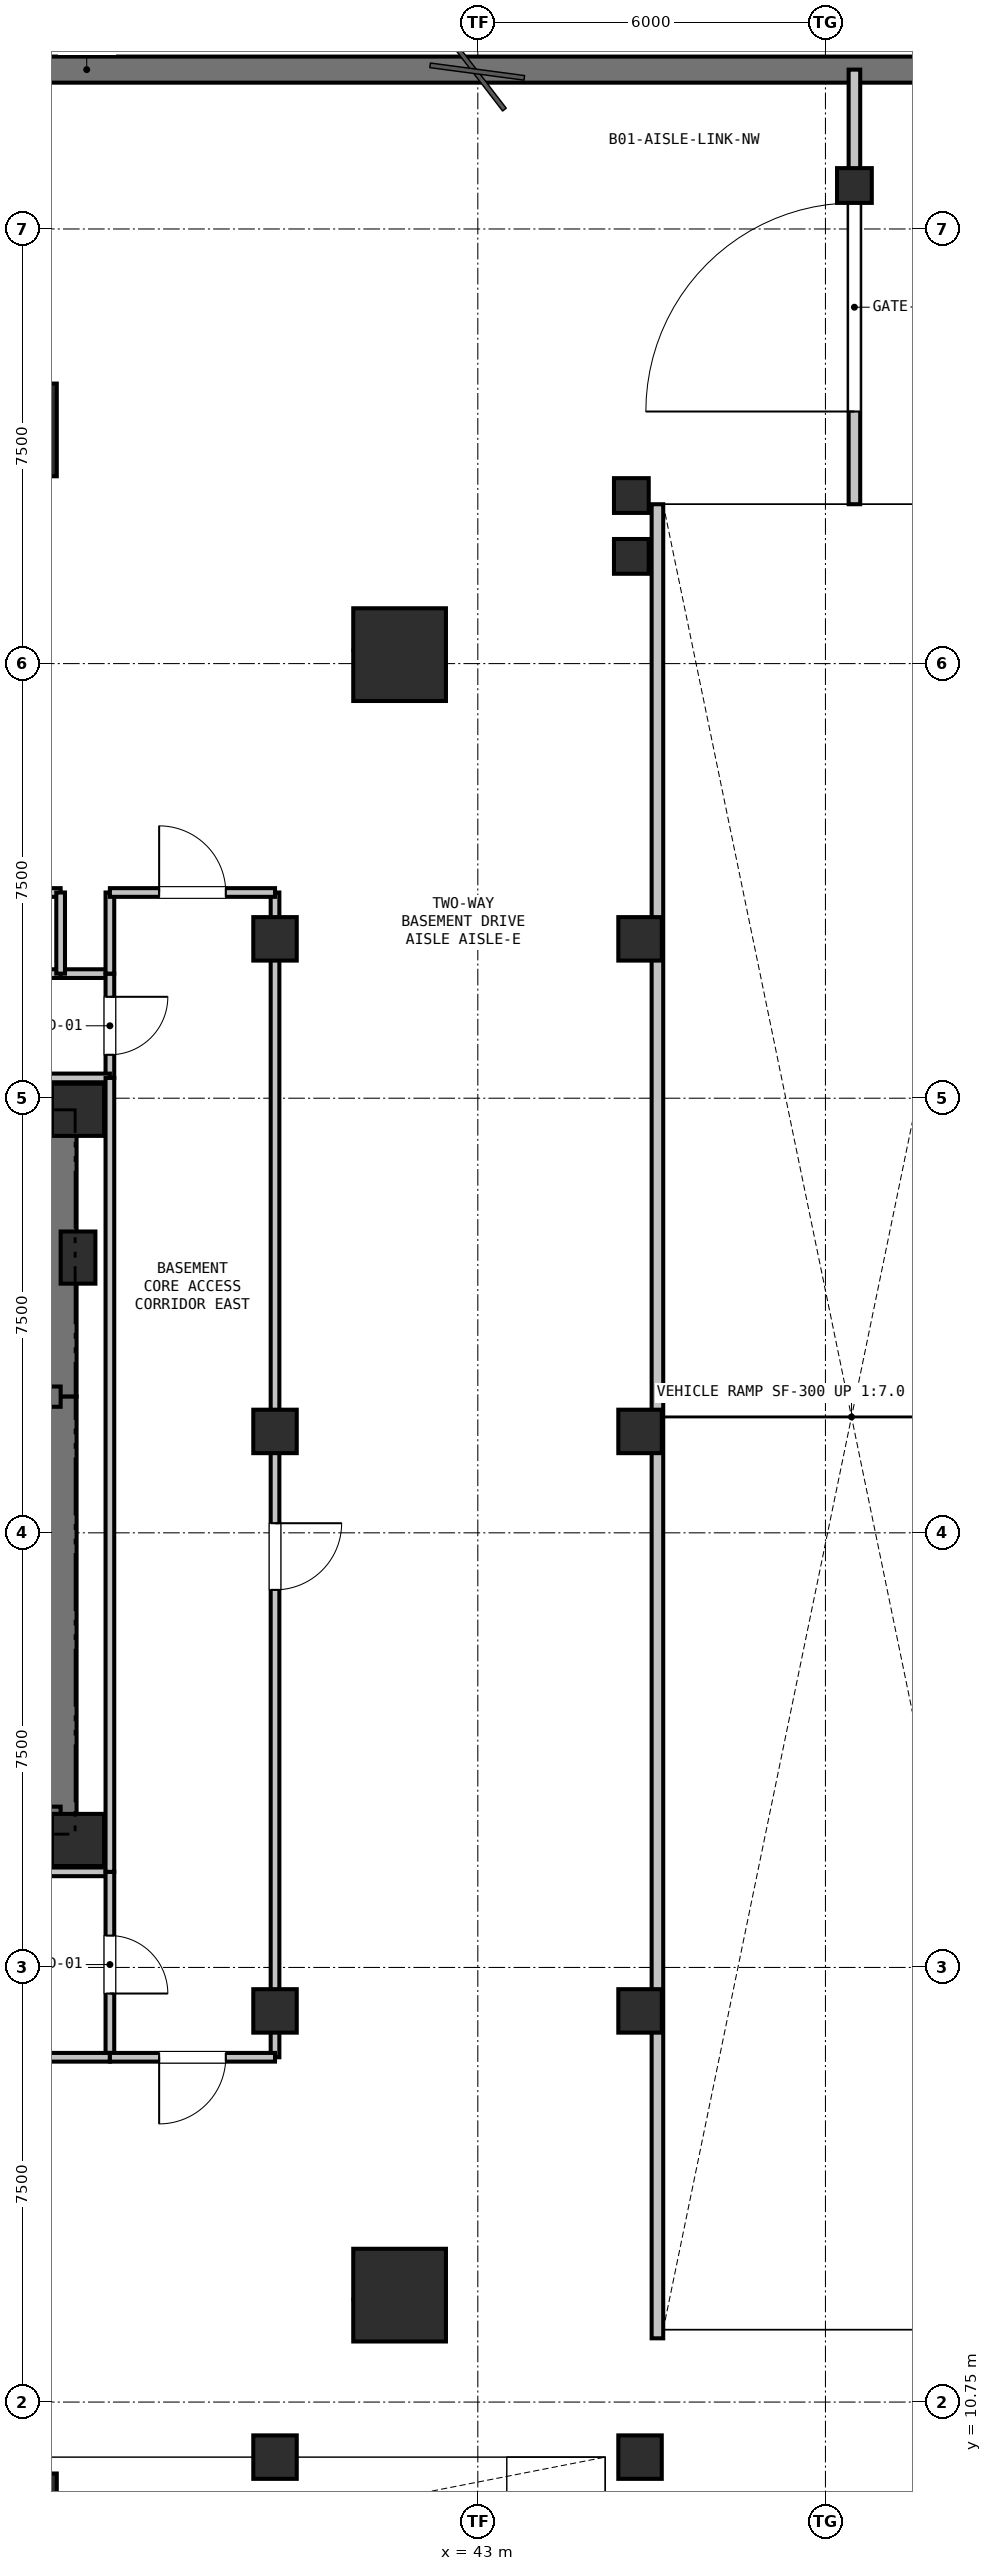
"""IFC4 building model, lengths in metres.
Left out: names, types, materials, properties, quantities, classifications, styles, units other than length and angle.
Written with IfcOpenShell. Run it as: python <this file> out.ifc"""

import sys

from ifc_helpers import new_model, si_unit, direction, frame, frame_2d, origin, origin_2d, place, context, subcontext, project, spatial, rectangle, hollow_rectangle, extrude, element, fill, save


model = new_model("IFC4")
c1 = context("Model", 3, precision=1e-05, world=origin(), true_north=direction((0.0, 1.0)))
c2 = subcontext(c1, "Body", "Model", "MODEL_VIEW")
j1 = project(units=[si_unit("LENGTHUNIT", "METRE"), si_unit("PLANEANGLEUNIT", "RADIAN")], contexts=[c1])
p1 = place(None, origin())
s1 = spatial("IfcSite", under=j1, at=p1, CompositionType="ELEMENT")
p2 = place(p1, origin())
s2 = spatial("IfcBuilding", under=s1, at=p2, CompositionType="ELEMENT")
p3 = place(p2, frame((0.0, 0.0, -4.5)))
s3 = spatial("IfcBuildingStorey", under=s2, at=p3, CompositionType="ELEMENT", Elevation=-4.5)
p4 = place(p3, frame((77.0, 51.0, 0.0), z_axis=(0.0, 0.0, 1.0), x_axis=(-1.0, 0.0, 0.0)))
e1 = element("IfcWall", 1, at=p4, inside=s3, PredefinedType="USERDEFINED", context=c2, shape_type="SweptSolid", body=[
    extrude(rectangle(XDim=81.5, YDim=0.45, at=frame_2d((40.75, 0.0))), origin(), (0.0, 0.0, 1.0), 4.5),
])
for number, where, z_axis, x_axis in (
    (2, (34.933, 44.783, 0.0), (0.0, 0.0, 1.0), (1.0, 0.0, 0.0)),
    (3, (41.65, 40.905, 0.0), (0.0, 0.0, 1.0), (1.0, 0.0, 0.0)),
    (4, (41.65, 12.595, 0.0), (0.0, 0.0, 1.0), (1.0, 0.0, 0.0)),
    (5, (34.933, 8.717, 0.0), (0.0, 0.0, 1.0), (1.0, 0.0, 0.0)),
):
    element("IfcColumn", number, at=place(p3, frame(where, z_axis=z_axis, x_axis=x_axis)), inside=s3, PredefinedType="COLUMN", context=c2, shape_type="SweptSolid", body=[
        extrude(hollow_rectangle(XDim=1.6, YDim=1.6, WallThickness=0.04, at=origin_2d()), origin(), (0.0, 0.0, 1.0), 4.5),
    ])
for number, where, z_axis, x_axis in (
    (6, (45.65, 42.6, 0.0), (0.0, 0.0, 1.0), (1.0, 0.0, 0.0)),
    (7, (49.5, 49.0, 0.0), (0.0, 0.0, 1.0), (1.0, 0.0, 0.0)),
    (8, (45.65, 43.65, 0.0), (0.0, 0.0, 1.0), (1.0, 0.0, 0.0)),
):
    element("IfcColumn", number, at=place(p3, frame(where, z_axis=z_axis, x_axis=x_axis)), inside=s3, PredefinedType="COLUMN", context=c2, shape_type="SweptSolid", body=[
        extrude(rectangle(XDim=0.6, YDim=0.6, at=origin_2d()), origin(), (0.0, 0.0, 1.0), 4.5),
    ])
for number, where, z_axis, x_axis in (
    (9, (39.5, 9.8, 0.0), (0.0, 0.0, 1.0), (1.0, 0.0, 0.0)),
    (10, (39.5, 17.5, 0.0), (0.0, 0.0, 1.0), (1.0, 0.0, 0.0)),
    (11, (39.5, 27.5, 0.0), (0.0, 0.0, 1.0), (1.0, 0.0, 0.0)),
    (12, (39.5, 36.0, 0.0), (0.0, 0.0, 1.0), (1.0, 0.0, 0.0)),
    (13, (45.8, 9.8, 0.0), (0.0, 0.0, 1.0), (1.0, 0.0, 0.0)),
    (14, (45.8, 17.5, 0.0), (0.0, 0.0, 1.0), (1.0, 0.0, 0.0)),
    (15, (45.8, 27.5, 0.0), (0.0, 0.0, 1.0), (1.0, 0.0, 0.0)),
    (16, (45.8, 36.0, 0.0), (0.0, 0.0, 1.0), (1.0, 0.0, 0.0)),
):
    element("IfcColumn", number, at=place(p3, frame(where, z_axis=z_axis, x_axis=x_axis)), inside=s3, PredefinedType="COLUMN", context=c2, shape_type="SweptSolid", body=[
        extrude(rectangle(XDim=0.75, YDim=0.75, at=origin_2d()), origin(), (0.0, 0.0, 1.0), 4.5),
    ])
for number, where, z_axis, x_axis in (
    (17, (36.1, 33.05, 0.0), (0.0, 0.0, 1.0), (1.0, 0.0, 0.0)),
    (18, (36.1, 20.45, 0.0), (0.0, 0.0, 1.0), (1.0, 0.0, 0.0)),
):
    element("IfcColumn", number, at=place(p3, frame(where, z_axis=z_axis, x_axis=x_axis)), inside=s3, PredefinedType="COLUMN", context=c2, shape_type="SweptSolid", body=[
        extrude(rectangle(XDim=0.9, YDim=0.9, at=origin_2d()), origin(), (0.0, 0.0, 1.0), 4.5),
    ])
p5 = place(p3, frame((36.1, 30.5, 0.0), z_axis=(0.0, 0.0, 1.0), x_axis=(1.0, 0.0, 0.0)))
e19 = element("IfcColumn", 19, at=p5, inside=s3, PredefinedType="PILASTER", context=c2, shape_type="SweptSolid", body=[
    extrude(rectangle(XDim=0.6, YDim=0.9, at=origin_2d()), origin(), (0.0, 0.0, 1.0), 4.5),
])
p6 = place(p3, frame((46.1, 11.85, 0.0), z_axis=(0.0, 0.0, 1.0), x_axis=(0.0, 1.0, 0.0)))
e20 = element("IfcWall", 20, at=p6, inside=s3, PredefinedType="PARAPET", context=c2, shape_type="SweptSolid", body=[
    extrude(rectangle(XDim=31.65, YDim=0.2, at=frame_2d((15.825, 0.0))), origin(), (0.0, 0.0, 1.0), 5.75),
])
p7 = place(p3, frame((32.35, 32.75, 0.0), z_axis=(0.0, 0.0, 1.0), x_axis=(1.0, 0.0, 0.0)))
e21 = element("IfcWall", 21, at=p7, inside=s3, PredefinedType="SHEAR", context=c2, shape_type="SweptSolid", body=[
    extrude(rectangle(XDim=3.45, YDim=0.55, at=frame_2d((1.725, 0.0))), origin(), (0.0, 0.0, 1.0), 4.2),
])
p8 = place(p7, frame((0.65, 0.0, 0.0)))
e22 = element("IfcOpeningElement", 22, at=p8, cuts=e21, PredefinedType="OPENING", context=c2, shape_type="SweptSolid", body=[
    extrude(rectangle(XDim=1.15, YDim=2.15, at=frame_2d((0.575, 1.075))), frame((0.0, 0.285, 0.0), z_axis=(0.0, -1.0, 0.0), x_axis=(1.0, 0.0, 0.0)), (0.0, 0.0, 1.0), 0.57),
])
p9 = place(p3, frame((35.8, 32.75, 0.0), z_axis=(0.0, 0.0, 1.0), x_axis=(0.0, -1.0, 0.0)))
e23 = element("IfcWall", 23, at=p9, inside=s3, PredefinedType="SHEAR", context=c2, shape_type="SweptSolid", body=[
    extrude(rectangle(XDim=4.65, YDim=0.55, at=frame_2d((2.325, 0.0))), origin(), (0.0, 0.0, 1.0), 4.2),
])
p10 = place(p3, frame((35.8, 28.1, 0.0), z_axis=(0.0, 0.0, 1.0), x_axis=(0.0, -1.0, 0.0)))
e24 = element("IfcWall", 24, at=p10, inside=s3, PredefinedType="SHEAR", context=c2, shape_type="SweptSolid", body=[
    extrude(rectangle(XDim=7.35, YDim=0.55, at=frame_2d((3.675, 0.0))), origin(), (0.0, 0.0, 1.0), 4.2),
])
p11 = place(p3, frame((35.8, 20.75, 0.0), z_axis=(0.0, 0.0, 1.0), x_axis=(-1.0, 0.0, 0.0)))
e25 = element("IfcWall", 25, at=p11, inside=s3, PredefinedType="SHEAR", context=c2, shape_type="SweptSolid", body=[
    extrude(rectangle(XDim=3.45, YDim=0.55, at=frame_2d((1.725, 0.0))), origin(), (0.0, 0.0, 1.0), 4.2),
])
p12 = place(p3, frame((32.35, 28.1, 0.0), z_axis=(0.0, 0.0, 1.0), x_axis=(1.0, 0.0, 0.0)))
e26 = element("IfcWall", 26, at=p12, inside=s3, PredefinedType="SHEAR", context=c2, shape_type="SweptSolid", body=[
    extrude(rectangle(XDim=3.45, YDim=0.35, at=frame_2d((1.725, 0.0))), origin(), (0.0, 0.0, 1.0), 4.2),
])
p13 = place(p12, frame((1.15, 0.0, 0.0)))
e27 = element("IfcOpeningElement", 27, at=p13, cuts=e26, PredefinedType="OPENING", context=c2, shape_type="SweptSolid", body=[
    extrude(rectangle(XDim=1.15, YDim=2.15, at=frame_2d((0.575, 1.075))), frame((0.0, 0.185, 0.0), z_axis=(0.0, -1.0, 0.0), x_axis=(1.0, 0.0, 0.0)), (0.0, 0.0, 1.0), 0.37),
])
p14 = place(p3, frame((49.5, 43.5, 0.0), z_axis=(0.0, 0.0, 1.0), x_axis=(0.0, 1.0, 0.0)))
e28 = element("IfcWall", 28, at=p14, inside=s3, PredefinedType="PARTITIONING", context=c2, shape_type="SweptSolid", body=[
    extrude(rectangle(XDim=7.5, YDim=0.2, at=frame_2d((3.75, 0.0))), origin(), (0.0, 0.0, 1.0), 4.2),
])
p15 = place(p14, frame((1.6, 0.0, 0.0)))
e29 = element("IfcOpeningElement", 29, at=p15, cuts=e28, PredefinedType="OPENING", context=c2, shape_type="SweptSolid", body=[
    extrude(rectangle(XDim=3.6, YDim=2.8, at=frame_2d((1.8, 1.4))), frame((0.0, 0.11, 0.0), z_axis=(0.0, -1.0, 0.0), x_axis=(1.0, 0.0, 0.0)), (0.0, 0.0, 1.0), 0.22),
])
p16 = place(p3, frame((22.2, 35.4, 0.0), z_axis=(0.0, 0.0, 1.0), x_axis=(1.0, 0.0, 0.0)))
e30 = element("IfcWall", 30, at=p16, inside=s3, PredefinedType="PARTITIONING", context=c2, shape_type="SweptSolid", body=[
    extrude(rectangle(XDim=13.6, YDim=0.15, at=frame_2d((6.8, 0.0))), origin(), (0.0, 0.0, 1.0), 4.2),
])
p17 = place(p16, frame((6.375, 0.0, 0.0)))
e31 = element("IfcOpeningElement", 31, at=p17, cuts=e30, PredefinedType="OPENING", context=c2, shape_type="SweptSolid", body=[
    extrude(rectangle(XDim=0.85, YDim=2.1, at=frame_2d((0.425, 1.05))), frame((0.0, 0.085, 0.0), z_axis=(0.0, -1.0, 0.0), x_axis=(1.0, 0.0, 0.0)), (0.0, 0.0, 1.0), 0.17),
])
p18 = place(p3, frame((35.8, 35.4, 0.0), z_axis=(0.0, 0.0, 1.0), x_axis=(1.0, 0.0, 0.0)))
e32 = element("IfcWall", 32, at=p18, inside=s3, PredefinedType="PARTITIONING", context=c2, shape_type="SweptSolid", body=[
    extrude(rectangle(XDim=0.85, YDim=0.15, at=frame_2d((0.425, 0.0))), origin(), (0.0, 0.0, 1.0), 4.2),
])
p19 = place(p3, frame((36.65, 35.4, 0.0), z_axis=(0.0, 0.0, 1.0), x_axis=(0.0, -1.0, 0.0)))
e33 = element("IfcWall", 33, at=p19, inside=s3, PredefinedType="PARTITIONING", context=c2, shape_type="SweptSolid", body=[
    extrude(rectangle(XDim=1.8, YDim=0.15, at=frame_2d((0.9, 0.0))), origin(), (0.0, 0.0, 1.0), 4.2),
])
p20 = place(p19, frame((0.4, 0.0, 0.0)))
e34 = element("IfcOpeningElement", 34, at=p20, cuts=e33, PredefinedType="OPENING", context=c2, shape_type="SweptSolid", body=[
    extrude(rectangle(XDim=1.0, YDim=2.15, at=frame_2d((0.5, 1.075))), frame((0.0, 0.085, 0.0), z_axis=(0.0, -1.0, 0.0), x_axis=(1.0, 0.0, 0.0)), (0.0, 0.0, 1.0), 0.17),
])
for number, where, z_axis, x_axis in (
    (35, (36.65, 33.6, 0.0), (0.0, 0.0, 1.0), (-1.0, 0.0, 0.0)),
    (36, (21.35, 19.9, 0.0), (0.0, 0.0, 1.0), (1.0, 0.0, 0.0)),
):
    element("IfcWall", number, at=place(p3, frame(where, z_axis=z_axis, x_axis=x_axis)), inside=s3, PredefinedType="PARTITIONING", context=c2, shape_type="SweptSolid", body=[
        extrude(rectangle(XDim=15.3, YDim=0.15, at=frame_2d((7.65, 0.0))), origin(), (0.0, 0.0, 1.0), 4.2),
    ])
p21 = place(p3, frame((36.65, 19.9, 0.0), z_axis=(0.0, 0.0, 1.0), x_axis=(0.0, -1.0, 0.0)))
e37 = element("IfcWall", 37, at=p21, inside=s3, PredefinedType="PARTITIONING", context=c2, shape_type="SweptSolid", body=[
    extrude(rectangle(XDim=3.2, YDim=0.15, at=frame_2d((1.6, 0.0))), origin(), (0.0, 0.0, 1.0), 4.2),
])
p22 = place(p21, frame((1.1, 0.0, 0.0)))
e38 = element("IfcOpeningElement", 38, at=p22, cuts=e37, PredefinedType="OPENING", context=c2, shape_type="SweptSolid", body=[
    extrude(rectangle(XDim=1.0, YDim=2.15, at=frame_2d((0.5, 1.075))), frame((0.0, 0.085, 0.0), z_axis=(0.0, -1.0, 0.0), x_axis=(1.0, 0.0, 0.0)), (0.0, 0.0, 1.0), 0.17),
])
p23 = place(p3, frame((36.65, 16.7, 0.0), z_axis=(0.0, 0.0, 1.0), x_axis=(-1.0, 0.0, 0.0)))
e39 = element("IfcWall", 39, at=p23, inside=s3, PredefinedType="PARTITIONING", context=c2, shape_type="SweptSolid", body=[
    extrude(rectangle(XDim=19.25, YDim=0.15, at=frame_2d((9.625, 0.0))), origin(), (0.0, 0.0, 1.0), 4.2),
])
p24 = place(p23, frame((9.05, 0.0, 0.0)))
e40 = element("IfcOpeningElement", 40, at=p24, cuts=e39, PredefinedType="OPENING", context=c2, shape_type="SweptSolid", body=[
    extrude(rectangle(XDim=1.15, YDim=2.15, at=frame_2d((0.575, 1.075))), frame((0.0, 0.085, 0.0), z_axis=(0.0, -1.0, 0.0), x_axis=(1.0, 0.0, 0.0)), (0.0, 0.0, 1.0), 0.17),
])
p25 = place(p3, frame((39.5, 36.8, 0.0), z_axis=(0.0, 0.0, 1.0), x_axis=(0.0, -1.0, 0.0)))
e41 = element("IfcWall", 41, at=p25, inside=s3, PredefinedType="PARTITIONING", context=c2, shape_type="SweptSolid", body=[
    extrude(rectangle(XDim=20.1, YDim=0.15, at=frame_2d((10.05, 0.0))), origin(), (0.0, 0.0, 1.0), 4.2),
])
p26 = place(p25, frame((10.884, 0.0, 0.0)))
e42 = element("IfcOpeningElement", 42, at=p26, cuts=e41, PredefinedType="OPENING", context=c2, shape_type="SweptSolid", body=[
    extrude(rectangle(XDim=1.15, YDim=2.15, at=frame_2d((0.575, 1.075))), frame((0.0, 0.085, 0.0), z_axis=(0.0, -1.0, 0.0), x_axis=(1.0, 0.0, 0.0)), (0.0, 0.0, 1.0), 0.17),
])
p27 = place(p3, frame((39.5, 16.7, 0.0), z_axis=(0.0, 0.0, 1.0), x_axis=(-1.0, 0.0, 0.0)))
e43 = element("IfcWall", 43, at=p27, inside=s3, PredefinedType="PARTITIONING", context=c2, shape_type="SweptSolid", body=[
    extrude(rectangle(XDim=2.85, YDim=0.15, at=frame_2d((1.425, 0.0))), origin(), (0.0, 0.0, 1.0), 4.2),
])
p28 = place(p27, frame((0.85, 0.0, 0.0)))
e44 = element("IfcOpeningElement", 44, at=p28, cuts=e43, PredefinedType="OPENING", context=c2, shape_type="SweptSolid", body=[
    extrude(rectangle(XDim=1.15, YDim=2.15, at=frame_2d((0.575, 1.075))), frame((0.0, 0.085, 0.0), z_axis=(0.0, -1.0, 0.0), x_axis=(1.0, 0.0, 0.0)), (0.0, 0.0, 1.0), 0.17),
])
p29 = place(p3, frame((36.65, 19.9, 0.0), z_axis=(0.0, 0.0, 1.0), x_axis=(0.0, 1.0, 0.0)))
e45 = element("IfcWall", 45, at=p29, inside=s3, PredefinedType="PARTITIONING", context=c2, shape_type="SweptSolid", body=[
    extrude(rectangle(XDim=13.7, YDim=0.15, at=frame_2d((6.85, 0.0))), origin(), (0.0, 0.0, 1.0), 4.2),
])
p30 = place(p3, frame((36.65, 35.4, 0.0), z_axis=(0.0, 0.0, 1.0), x_axis=(0.0, 1.0, 0.0)))
e46 = element("IfcWall", 46, at=p30, inside=s3, PredefinedType="PARTITIONING", context=c2, shape_type="SweptSolid", body=[
    extrude(rectangle(XDim=1.4, YDim=0.15, at=frame_2d((0.7, 0.0))), origin(), (0.0, 0.0, 1.0), 4.2),
])
p31 = place(p3, frame((36.65, 36.8, 0.0), z_axis=(0.0, 0.0, 1.0), x_axis=(1.0, 0.0, 0.0)))
e47 = element("IfcWall", 47, at=p31, inside=s3, PredefinedType="PARTITIONING", context=c2, shape_type="SweptSolid", body=[
    extrude(rectangle(XDim=2.85, YDim=0.15, at=frame_2d((1.425, 0.0))), origin(), (0.0, 0.0, 1.0), 4.2),
])
p32 = place(p31, frame((0.85, 0.0, 0.0)))
e48 = element("IfcOpeningElement", 48, at=p32, cuts=e47, PredefinedType="OPENING", context=c2, shape_type="SweptSolid", body=[
    extrude(rectangle(XDim=1.15, YDim=2.15, at=frame_2d((0.575, 1.075))), frame((0.0, 0.085, 0.0), z_axis=(0.0, -1.0, 0.0), x_axis=(1.0, 0.0, 0.0)), (0.0, 0.0, 1.0), 0.17),
])
p33 = place(p3, frame((22.2, 36.8, 0.0), z_axis=(0.0, 0.0, 1.0), x_axis=(1.0, 0.0, 0.0)))
e49 = element("IfcWall", 49, at=p33, inside=s3, PredefinedType="PARTITIONING", context=c2, shape_type="SweptSolid", body=[
    extrude(rectangle(XDim=13.6, YDim=0.15, at=frame_2d((6.8, 0.0))), origin(), (0.0, 0.0, 1.0), 4.2),
])
p34 = place(p33, frame((6.225, 0.0, 0.0)))
e50 = element("IfcOpeningElement", 50, at=p34, cuts=e49, PredefinedType="OPENING", context=c2, shape_type="SweptSolid", body=[
    extrude(rectangle(XDim=1.15, YDim=2.15, at=frame_2d((0.575, 1.075))), frame((0.0, 0.085, 0.0), z_axis=(0.0, -1.0, 0.0), x_axis=(1.0, 0.0, 0.0)), (0.0, 0.0, 1.0), 0.17),
])
p35 = place(p3, frame((35.8, 36.8, 0.0), z_axis=(0.0, 0.0, 1.0), x_axis=(0.0, -1.0, 0.0)))
e51 = element("IfcWall", 51, at=p35, inside=s3, PredefinedType="PARTITIONING", context=c2, shape_type="SweptSolid", body=[
    extrude(rectangle(XDim=1.4, YDim=0.15, at=frame_2d((0.7, 0.0))), origin(), (0.0, 0.0, 1.0), 4.2),
])
p36 = place(p15, origin())
e52 = element("IfcDoor", 52, at=p36, inside=s3, OperationType="ROLLINGUP", PredefinedType="GATE", context=c2, shape_type="SweptSolid", body=[
    extrude(rectangle(XDim=3.6, YDim=2.8, at=frame_2d((1.8, 1.4))), frame((0.0, 0.025, 0.0), z_axis=(0.0, -1.0, 0.0), x_axis=(1.0, 0.0, 0.0)), (0.0, 0.0, 1.0), 0.05),
])
fill(e29, e52)
p37 = place(p20, origin())
e53 = element("IfcDoor", 53, at=p37, inside=s3, OperationType="SINGLE_SWING_LEFT", PredefinedType="DOOR", context=c2, shape_type="SweptSolid", body=[
    extrude(rectangle(XDim=1.0, YDim=2.15, at=frame_2d((0.5, 1.075))), frame((0.0, 0.025, 0.0), z_axis=(0.0, -1.0, 0.0), x_axis=(1.0, 0.0, 0.0)), (0.0, 0.0, 1.0), 0.05),
])
fill(e34, e53)
p38 = place(p22, origin())
e54 = element("IfcDoor", 54, at=p38, inside=s3, OperationType="SINGLE_SWING_RIGHT", PredefinedType="DOOR", context=c2, shape_type="SweptSolid", body=[
    extrude(rectangle(XDim=1.0, YDim=2.15, at=frame_2d((0.5, 1.075))), frame((0.0, 0.025, 0.0), z_axis=(0.0, -1.0, 0.0), x_axis=(1.0, 0.0, 0.0)), (0.0, 0.0, 1.0), 0.05),
])
fill(e38, e54)
p39 = place(p26, origin())
e55 = element("IfcDoor", 55, at=p39, inside=s3, OperationType="SINGLE_SWING_LEFT", PredefinedType="DOOR", context=c2, shape_type="SweptSolid", body=[
    extrude(rectangle(XDim=1.15, YDim=2.15, at=frame_2d((0.575, 1.075))), frame((0.0, 0.025, 0.0), z_axis=(0.0, -1.0, 0.0), x_axis=(1.0, 0.0, 0.0)), (0.0, 0.0, 1.0), 0.05),
])
fill(e42, e55)
p40 = place(p28, origin())
e56 = element("IfcDoor", 56, at=p40, inside=s3, OperationType="SINGLE_SWING_RIGHT", PredefinedType="DOOR", context=c2, shape_type="SweptSolid", body=[
    extrude(rectangle(XDim=1.15, YDim=2.15, at=frame_2d((0.575, 1.075))), frame((0.0, 0.025, 0.0), z_axis=(0.0, -1.0, 0.0), x_axis=(1.0, 0.0, 0.0)), (0.0, 0.0, 1.0), 0.05),
])
fill(e44, e56)
p41 = place(p32, origin())
e57 = element("IfcDoor", 57, at=p41, inside=s3, OperationType="SINGLE_SWING_LEFT", PredefinedType="DOOR", context=c2, shape_type="SweptSolid", body=[
    extrude(rectangle(XDim=1.15, YDim=2.15, at=frame_2d((0.575, 1.075))), frame((0.0, 0.025, 0.0), z_axis=(0.0, -1.0, 0.0), x_axis=(1.0, 0.0, 0.0)), (0.0, 0.0, 1.0), 0.05),
])
fill(e48, e57)
save(model, sys.argv[1])
